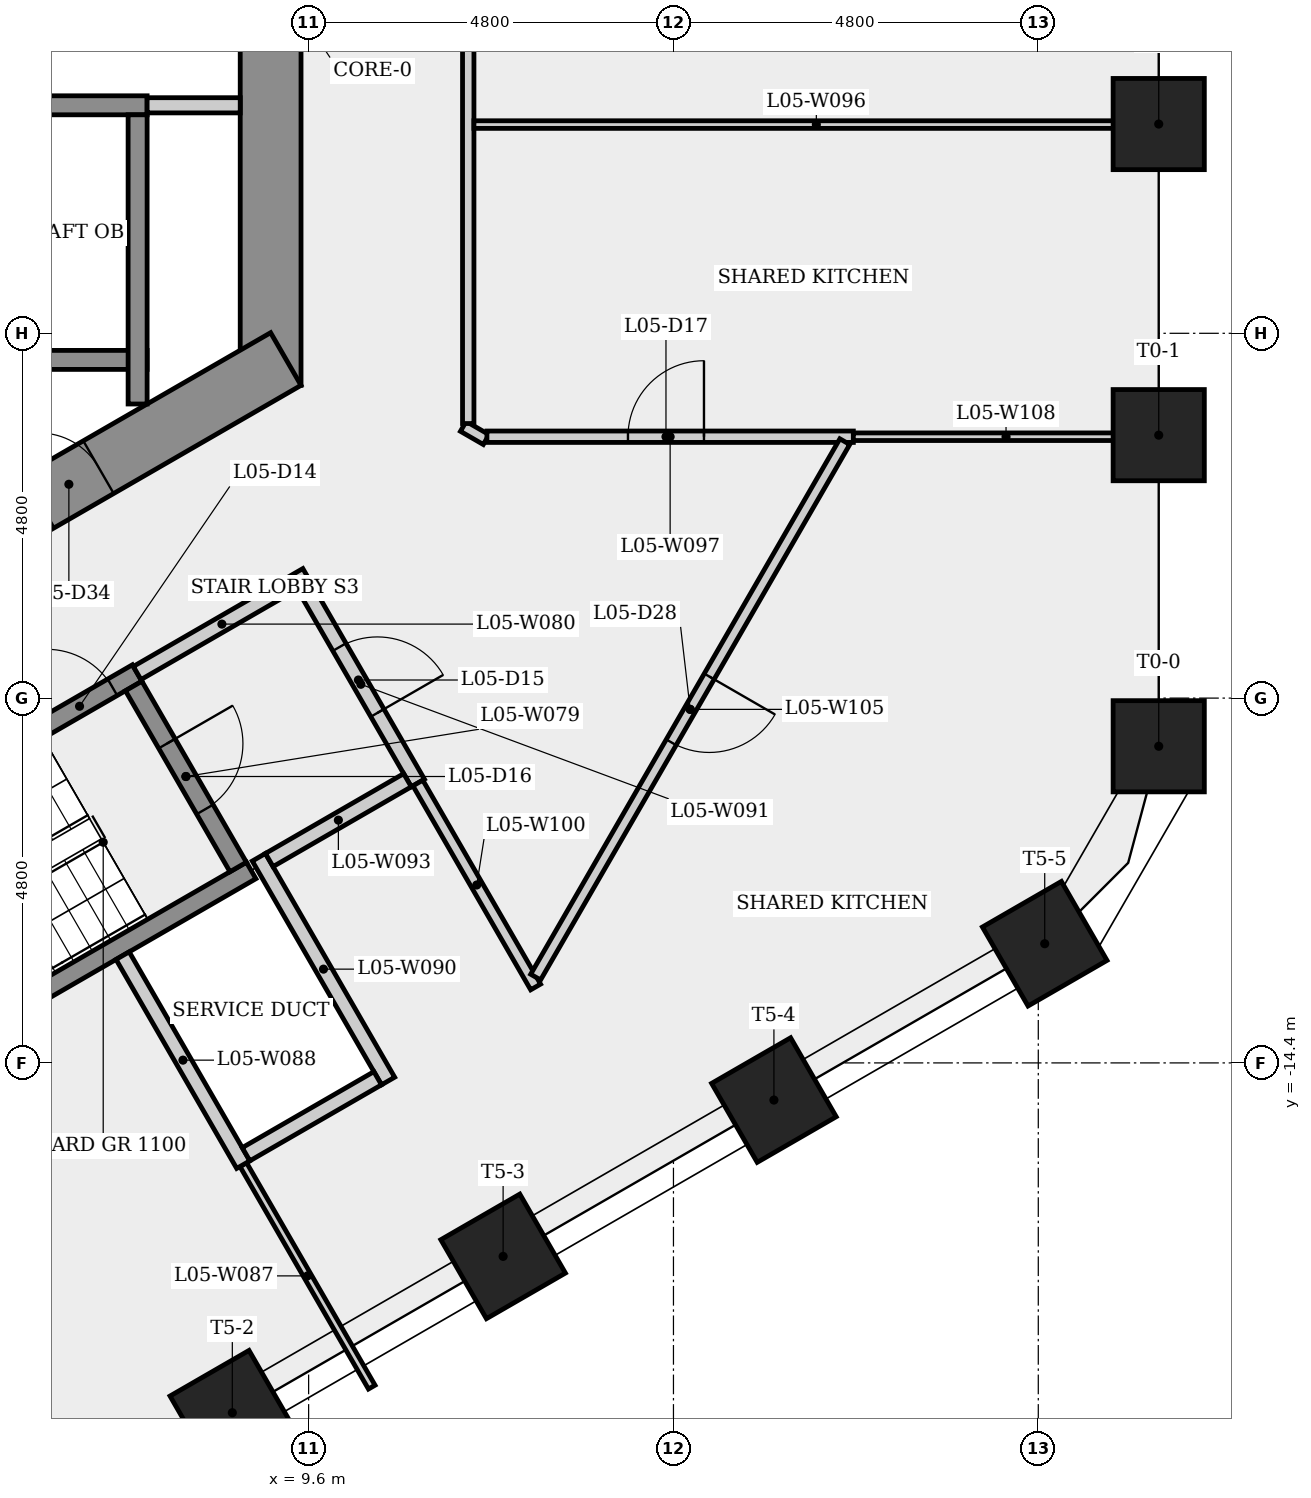
"""IFC4 building model, lengths in metres.
Left out: names, types, materials, properties, quantities, classifications, styles, units other than length and angle.
Written with IfcOpenShell. Run it as: python <this file> out.ifc"""

import sys

from ifc_helpers import new_model, si_unit, direction, frame, frame_2d, origin, origin_2d, place, context, subcontext, project, spatial, rectangle, extrude, element, fill, save


model = new_model("IFC4")
c1 = context("Model", 3, precision=1e-05, world=origin(), true_north=direction((0.0, 1.0)))
c2 = subcontext(c1, "Body", "Model", "MODEL_VIEW")
j1 = project(units=[si_unit("LENGTHUNIT", "METRE"), si_unit("PLANEANGLEUNIT", "RADIAN")], contexts=[c1])
p1 = place(None, origin())
s1 = spatial("IfcSite", under=j1, at=p1, CompositionType="ELEMENT")
p2 = place(p1, origin())
s2 = spatial("IfcBuilding", under=s1, at=p2, CompositionType="ELEMENT")
p3 = place(p2, frame((0.0, 0.0, 25.5)))
s3 = spatial("IfcBuildingStorey", under=s2, at=p3, CompositionType="ELEMENT", Elevation=25.5)
p4 = place(p3, frame((9.1, -5.485, 0.0), z_axis=(0.0, 0.0, 1.0), x_axis=(0.0, 1.0, 0.0)))
e1 = element("IfcWall", 1, at=p4, inside=s3, PredefinedType="SHEAR", context=c2, shape_type="SweptSolid", body=[
    extrude(rectangle(XDim=10.97, YDim=0.8, at=frame_2d((5.485, 0.0))), origin(), (0.0, 0.0, 1.0), 3.4),
])
p5 = place(p4, frame((4.685, 0.0, 0.0)))
e2 = element("IfcOpeningElement", 2, at=p5, cuts=e1, PredefinedType="OPENING", context=c2, shape_type="SweptSolid", body=[
    extrude(rectangle(XDim=1.6, YDim=2.1, at=frame_2d((0.8, 1.05))), frame((0.0, 0.41, 0.0), z_axis=(0.0, -1.0, 0.0), x_axis=(1.0, 0.0, 0.0)), (0.0, 0.0, 1.0), 0.82),
])
p6 = place(p3, frame((-0.2, -10.623, 0.0), z_axis=(0.0, 0.0, 1.0), x_axis=(0.866023993627, 0.500002442456, 0.0)))
e3 = element("IfcWall", 3, at=p6, inside=s3, PredefinedType="SHEAR", context=c2, shape_type="SweptSolid", body=[
    extrude(rectangle(XDim=10.97, YDim=0.8, at=frame_2d((5.485, 0.0))), origin(), (0.0, 0.0, 1.0), 3.4),
])
p7 = place(p6, frame((7.224, 0.0, 0.0)))
e4 = element("IfcOpeningElement", 4, at=p7, cuts=e3, PredefinedType="OPENING", context=c2, shape_type="SweptSolid", body=[
    extrude(rectangle(XDim=0.9, YDim=2.1, at=frame_2d((0.45, 1.05))), frame((0.0, 0.41, 0.0), z_axis=(0.0, -1.0, 0.0), x_axis=(1.0, 0.0, 0.0)), (0.0, 0.0, 1.0), 0.82),
])
for number, where, z_axis, x_axis in (
    (5, (20.785, -10.234, 0.0), (0.0, 0.0, 1.0), (1.0, 0.0, 0.0)),
    (6, (20.785, -6.14, 0.0), (0.0, 0.0, 1.0), (1.0, 0.0, 0.0)),
    (7, (20.785, -2.047, 0.0), (0.0, 0.0, 1.0), (1.0, 0.0, 0.0)),
    (8, (8.596, -19.003, 0.0), (0.0, 0.0, 1.0), (0.5, -0.866, 0.0)),
    (9, (12.159, -16.946, 0.0), (0.0, 0.0, 1.0), (0.5, -0.866, 0.0)),
    (10, (15.722, -14.889, 0.0), (0.0, 0.0, 1.0), (0.5, -0.866, 0.0)),
    (11, (19.285, -12.832, 0.0), (0.0, 0.0, 1.0), (0.5, -0.866, 0.0)),
):
    element("IfcColumn", number, at=place(p3, frame(where, z_axis=z_axis, x_axis=x_axis)), inside=s3, PredefinedType="COLUMN", context=c2, shape_type="SweptSolid", body=[
        extrude(rectangle(XDim=1.2, YDim=1.2, at=origin_2d()), origin(), (0.0, 0.0, 1.0), 3.4),
    ])
p8 = place(p3, frame((-7.225, -5.15, 0.0), z_axis=(0.0, 0.0, 1.0), x_axis=(1.0, 0.0, 0.0)))
e12 = element("IfcWall", 12, at=p8, inside=s3, PredefinedType="SHEAR", context=c2, shape_type="SweptSolid", body=[
    extrude(rectangle(XDim=14.7, YDim=0.25, at=frame_2d((7.35, 0.0))), origin(), (0.0, 0.0, 1.0), 3.05),
])
p9 = place(p3, frame((-7.225, -1.8, 0.0), z_axis=(0.0, 0.0, 1.0), x_axis=(1.0, 0.0, 0.0)))
e13 = element("IfcWall", 13, at=p9, inside=s3, PredefinedType="SHEAR", context=c2, shape_type="SweptSolid", body=[
    extrude(rectangle(XDim=14.7, YDim=0.25, at=frame_2d((7.35, 0.0))), origin(), (0.0, 0.0, 1.0), 3.05),
])
p10 = place(p9, frame((0.597, 0.0, 0.0)))
e14 = element("IfcOpeningElement", 14, at=p10, cuts=e13, PredefinedType="OPENING", context=c2, shape_type="SweptSolid", body=[
    extrude(rectangle(XDim=1.1, YDim=2.1, at=frame_2d((0.55, 1.05))), frame((0.0, 0.135, 0.0), z_axis=(0.0, -1.0, 0.0), x_axis=(1.0, 0.0, 0.0)), (0.0, 0.0, 1.0), 0.27),
])
p11 = place(p9, frame((3.0, 0.0, 0.0)))
e15 = element("IfcOpeningElement", 15, at=p11, cuts=e13, PredefinedType="OPENING", context=c2, shape_type="SweptSolid", body=[
    extrude(rectangle(XDim=1.1, YDim=2.1, at=frame_2d((0.55, 1.05))), frame((0.0, 0.135, 0.0), z_axis=(0.0, -1.0, 0.0), x_axis=(1.0, 0.0, 0.0)), (0.0, 0.0, 1.0), 0.27),
])
p12 = place(p9, frame((5.45, 0.0, 0.0)))
e16 = element("IfcOpeningElement", 16, at=p12, cuts=e13, PredefinedType="OPENING", context=c2, shape_type="SweptSolid", body=[
    extrude(rectangle(XDim=1.1, YDim=2.1, at=frame_2d((0.55, 1.05))), frame((0.0, 0.135, 0.0), z_axis=(0.0, -1.0, 0.0), x_axis=(1.0, 0.0, 0.0)), (0.0, 0.0, 1.0), 0.27),
])
p13 = place(p9, frame((7.9, 0.0, 0.0)))
e17 = element("IfcOpeningElement", 17, at=p13, cuts=e13, PredefinedType="OPENING", context=c2, shape_type="SweptSolid", body=[
    extrude(rectangle(XDim=1.1, YDim=2.1, at=frame_2d((0.55, 1.05))), frame((0.0, 0.135, 0.0), z_axis=(0.0, -1.0, 0.0), x_axis=(1.0, 0.0, 0.0)), (0.0, 0.0, 1.0), 0.27),
])
p14 = place(p9, frame((10.35, 0.0, 0.0)))
e18 = element("IfcOpeningElement", 18, at=p14, cuts=e13, PredefinedType="OPENING", context=c2, shape_type="SweptSolid", body=[
    extrude(rectangle(XDim=1.1, YDim=2.1, at=frame_2d((0.55, 1.05))), frame((0.0, 0.135, 0.0), z_axis=(0.0, -1.0, 0.0), x_axis=(1.0, 0.0, 0.0)), (0.0, 0.0, 1.0), 0.27),
])
p15 = place(p3, frame((1.585, -12.595, 0.0), z_axis=(0.0, 0.0, 1.0), x_axis=(0.866036417653, 0.499980922934, 0.0)))
e19 = element("IfcWall", 19, at=p15, inside=s3, PredefinedType="SHEAR", context=c2, shape_type="SweptSolid", body=[
    extrude(rectangle(XDim=6.65, YDim=0.25, at=frame_2d((3.325, 0.0))), origin(), (0.0, 0.0, 1.0), 3.05),
])
p16 = place(p15, frame((5.275, 0.0, 0.0)))
e20 = element("IfcOpeningElement", 20, at=p16, cuts=e19, PredefinedType="OPENING", context=c2, shape_type="SweptSolid", body=[
    extrude(rectangle(XDim=1.0, YDim=2.1, at=frame_2d((0.5, 1.05))), frame((0.0, 0.135, 0.0), z_axis=(0.0, -1.0, 0.0), x_axis=(1.0, 0.0, 0.0)), (0.0, 0.0, 1.0), 0.27),
])
p17 = place(p3, frame((3.301, -15.068, 0.0), z_axis=(0.0, 0.0, 1.0), x_axis=(0.866035036182, 0.499983315828, 0.0)))
e21 = element("IfcWall", 21, at=p17, inside=s3, PredefinedType="SHEAR", context=c2, shape_type="SweptSolid", body=[
    extrude(rectangle(XDim=6.4, YDim=0.25, at=frame_2d((3.2, 0.0))), origin(), (0.0, 0.0, 1.0), 3.05),
])
p18 = place(p3, frame((7.298, -9.441, 0.0), z_axis=(0.0, 0.0, 1.0), x_axis=(0.500034990121, -0.866005201286, 0.0)))
e22 = element("IfcWall", 22, at=p18, inside=s3, PredefinedType="SHEAR", context=c2, shape_type="SweptSolid", body=[
    extrude(rectangle(XDim=2.75, YDim=0.25, at=frame_2d((1.375, 0.0))), origin(), (0.0, 0.0, 1.0), 3.05),
])
p19 = place(p18, frame((0.875, 0.0, 0.0)))
e23 = element("IfcOpeningElement", 23, at=p19, cuts=e22, PredefinedType="OPENING", context=c2, shape_type="SweptSolid", body=[
    extrude(rectangle(XDim=1.0, YDim=2.1, at=frame_2d((0.5, 1.05))), frame((0.0, 0.135, 0.0), z_axis=(0.0, -1.0, 0.0), x_axis=(1.0, 0.0, 0.0)), (0.0, 0.0, 1.0), 0.27),
])
p20 = place(p3, frame((7.344, -9.27, 0.0), z_axis=(0.0, 0.0, 1.0), x_axis=(0.866005588531, 0.500034319456, 0.0)))
e24 = element("IfcWall", 24, at=p20, inside=s3, PredefinedType="PARTITIONING", context=c2, shape_type="SweptSolid", body=[
    extrude(rectangle(XDim=2.575, YDim=0.2, at=frame_2d((1.288, 0.0))), origin(), (0.0, 0.0, 1.0), 3.05),
])
p21 = place(p3, frame((7.35, -1.925, 0.0), z_axis=(0.0, 0.0, 1.0), x_axis=(0.0, -1.0, 0.0)))
e25 = element("IfcWall", 25, at=p21, inside=s3, PredefinedType="SHEAR", context=c2, shape_type="SweptSolid", body=[
    extrude(rectangle(XDim=3.805, YDim=0.25, at=frame_2d((1.903, 0.0))), origin(), (0.0, 0.0, 1.0), 3.05),
])
p22 = place(p3, frame((8.74, -15.738, 0.0), z_axis=(0.0, 0.0, 1.0), x_axis=(0.4999912383, -0.866030462295, 0.0)))
e26 = element("IfcWall", 26, at=p22, inside=s3, PredefinedType="PARTITIONING", context=c2, shape_type="SweptSolid", body=[
    extrude(rectangle(XDim=3.381, YDim=0.1, at=frame_2d((1.69, 0.0))), origin(), (0.0, 0.0, 1.0), 3.05),
])
p23 = place(p3, frame((8.74, -15.739, 0.0), z_axis=(0.0, 0.0, 1.0), x_axis=(-0.500017526161, 0.866015284814, 0.0)))
e27 = element("IfcWall", 27, at=p23, inside=s3, PredefinedType="PLUMBINGWALL", context=c2, shape_type="SweptSolid", body=[
    extrude(rectangle(XDim=3.175, YDim=0.2, at=frame_2d((1.588, 0.0))), origin(), (0.0, 0.0, 1.0), 3.05),
])
p24 = place(p3, frame((8.7, -1.8, 0.0), z_axis=(0.0, 0.0, 1.0), x_axis=(-1.0, 0.0, 0.0)))
e28 = element("IfcWall", 28, at=p24, inside=s3, PredefinedType="PARTITIONING", context=c2, shape_type="SweptSolid", body=[
    extrude(rectangle(XDim=1.225, YDim=0.2, at=frame_2d((0.613, 0.0))), origin(), (0.0, 0.0, 1.0), 3.05),
])
p25 = place(p3, frame((8.945, -11.694, 0.0), z_axis=(0.0, 0.0, 1.0), x_axis=(0.500062241894, -0.865989465428, 0.0)))
e29 = element("IfcWall", 29, at=p25, inside=s3, PredefinedType="PLUMBINGWALL", context=c2, shape_type="SweptSolid", body=[
    extrude(rectangle(XDim=3.4, YDim=0.2, at=frame_2d((1.7, 0.0))), origin(), (0.0, 0.0, 1.0), 3.05),
])
p26 = place(p3, frame((9.537, -8.119, 0.0), z_axis=(0.0, 0.0, 1.0), x_axis=(0.499990139034, -0.866031096941, 0.0)))
e30 = element("IfcWall", 30, at=p26, inside=s3, PredefinedType="PARTITIONING", context=c2, shape_type="SweptSolid", body=[
    extrude(rectangle(XDim=3.0, YDim=0.2, at=frame_2d((1.5, 0.0))), origin(), (0.0, 0.0, 1.0), 3.05),
])
p27 = place(p26, frame((0.935, 0.0, 0.0)))
e31 = element("IfcOpeningElement", 31, at=p27, cuts=e30, PredefinedType="OPENING", context=c2, shape_type="SweptSolid", body=[
    extrude(rectangle(XDim=1.0, YDim=2.1, at=frame_2d((0.5, 1.05))), frame((0.0, 0.11, 0.0), z_axis=(0.0, -1.0, 0.0), x_axis=(1.0, 0.0, 0.0)), (0.0, 0.0, 1.0), 0.22),
])
p28 = place(p3, frame((10.509, -14.602, 0.0), z_axis=(0.0, 0.0, 1.0), x_axis=(-0.866010750942, -0.50002537861, 0.0)))
e32 = element("IfcWall", 32, at=p28, inside=s3, PredefinedType="PLUMBINGWALL", context=c2, shape_type="SweptSolid", body=[
    extrude(rectangle(XDim=2.0, YDim=0.2, at=frame_2d((1.0, 0.0))), origin(), (0.0, 0.0, 1.0), 3.05),
])
p29 = place(p3, frame((10.901, -10.681, 0.0), z_axis=(0.0, 0.0, 1.0), x_axis=(-0.866009402589, -0.500027713859, 0.0)))
e33 = element("IfcWall", 33, at=p29, inside=s3, PredefinedType="PARTITIONING", context=c2, shape_type="SweptSolid", body=[
    extrude(rectangle(XDim=2.1, YDim=0.2, at=frame_2d((1.05, 0.0))), origin(), (0.0, 0.0, 1.0), 3.05),
])
p30 = place(p3, frame((11.635, -6.025, 0.0), z_axis=(0.0, 0.0, 1.0), x_axis=(0.866115353951, -0.499844169366, 0.0)))
e34 = element("IfcWall", 34, at=p30, inside=s3, PredefinedType="PARTITIONING", context=c2, shape_type="SweptSolid", body=[
    extrude(rectangle(XDim=0.347, YDim=0.15, at=frame_2d((0.174, 0.0))), origin(), (0.0, 0.0, 1.0), 3.05),
])
p31 = place(p3, frame((11.7, -5.987, 0.0), z_axis=(0.0, 0.0, 1.0), x_axis=(0.0, 1.0, 0.0)))
e35 = element("IfcWall", 35, at=p31, inside=s3, PredefinedType="PARTITIONING", context=c2, shape_type="SweptSolid", body=[
    extrude(rectangle(XDim=12.125, YDim=0.15, at=frame_2d((6.062, 0.0))), origin(), (0.0, 0.0, 1.0), 3.05),
])
p32 = place(p31, frame((7.507, 0.0, 0.0)))
e36 = element("IfcOpeningElement", 36, at=p32, cuts=e35, PredefinedType="OPENING", context=c2, shape_type="SweptSolid", body=[
    extrude(rectangle(XDim=1.0, YDim=2.1, at=frame_2d((0.5, 1.05))), frame((0.0, 0.085, 0.0), z_axis=(0.0, -1.0, 0.0), x_axis=(1.0, 0.0, 0.0)), (0.0, 0.0, 1.0), 0.17),
])
p33 = place(p3, frame((11.775, -2.054, 0.0), z_axis=(0.0, 0.0, 1.0), x_axis=(1.0, 0.0, 0.0)))
e37 = element("IfcWall", 37, at=p33, inside=s3, PredefinedType="PARTITIONING", context=c2, shape_type="SweptSolid", body=[
    extrude(rectangle(XDim=9.01, YDim=0.1, at=frame_2d((4.505, 0.0))), origin(), (0.0, 0.0, 1.0), 3.05),
])
p34 = place(p3, frame((11.946, -6.161, 0.0), z_axis=(0.0, 0.0, 1.0), x_axis=(1.0, 0.0, 0.0)))
e38 = element("IfcWall", 38, at=p34, inside=s3, PredefinedType="PARTITIONING", context=c2, shape_type="SweptSolid", body=[
    extrude(rectangle(XDim=4.821, YDim=0.15, at=frame_2d((2.411, 0.0))), origin(), (0.0, 0.0, 1.0), 3.05),
])
p35 = place(p34, frame((1.856, 0.0, 0.0)))
e39 = element("IfcOpeningElement", 39, at=p35, cuts=e38, PredefinedType="OPENING", context=c2, shape_type="SweptSolid", body=[
    extrude(rectangle(XDim=1.0, YDim=2.1, at=frame_2d((0.5, 1.05))), frame((0.0, 0.085, 0.0), z_axis=(0.0, -1.0, 0.0), x_axis=(1.0, 0.0, 0.0)), (0.0, 0.0, 1.0), 0.17),
])
p36 = place(p3, frame((12.587, -13.401, 0.0), z_axis=(0.0, 0.0, 1.0), x_axis=(-0.499952049853, 0.866053086045, 0.0)))
e40 = element("IfcWall", 40, at=p36, inside=s3, PredefinedType="PARTITIONING", context=c2, shape_type="SweptSolid", body=[
    extrude(rectangle(XDim=3.099, YDim=0.15, at=frame_2d((1.549, 0.0))), origin(), (0.0, 0.0, 1.0), 3.05),
])
p37 = place(p3, frame((16.654, -6.226, 0.0), z_axis=(0.0, 0.0, 1.0), x_axis=(-0.499996082157, -0.86602766574, 0.0)))
e41 = element("IfcWall", 41, at=p37, inside=s3, PredefinedType="PARTITIONING", context=c2, shape_type="SweptSolid", body=[
    extrude(rectangle(XDim=8.135, YDim=0.15, at=frame_2d((4.068, 0.0))), origin(), (0.0, 0.0, 1.0), 3.05),
])
p38 = place(p37, frame((3.568, 0.0, 0.0)))
e42 = element("IfcOpeningElement", 42, at=p38, cuts=e41, PredefinedType="OPENING", context=c2, shape_type="SweptSolid", body=[
    extrude(rectangle(XDim=1.0, YDim=2.1, at=frame_2d((0.5, 1.05))), frame((0.0, 0.085, 0.0), z_axis=(0.0, -1.0, 0.0), x_axis=(1.0, 0.0, 0.0)), (0.0, 0.0, 1.0), 0.17),
])
p39 = place(p3, frame((20.785, -6.161, 0.0), z_axis=(0.0, 0.0, 1.0), x_axis=(-1.0, 0.0, 0.0)))
e43 = element("IfcWall", 43, at=p39, inside=s3, PredefinedType="PARTITIONING", context=c2, shape_type="SweptSolid", body=[
    extrude(rectangle(XDim=4.018, YDim=0.1, at=frame_2d((2.009, 0.0))), origin(), (0.0, 0.0, 1.0), 3.05),
])
p40 = place(p16, origin())
e44 = element("IfcDoor", 44, at=p40, inside=s3, OperationType="SINGLE_SWING_LEFT", PredefinedType="DOOR", context=c2, shape_type="SweptSolid", body=[
    extrude(rectangle(XDim=1.0, YDim=2.1, at=frame_2d((0.5, 1.05))), frame((0.0, 0.025, 0.0), z_axis=(0.0, -1.0, 0.0), x_axis=(1.0, 0.0, 0.0)), (0.0, 0.0, 1.0), 0.05),
])
fill(e20, e44)
p41 = place(p27, origin())
e45 = element("IfcDoor", 45, at=p41, inside=s3, OperationType="SINGLE_SWING_RIGHT", PredefinedType="DOOR", context=c2, shape_type="SweptSolid", body=[
    extrude(rectangle(XDim=1.0, YDim=2.1, at=frame_2d((0.5, 1.05))), frame((0.0, 0.025, 0.0), z_axis=(0.0, -1.0, 0.0), x_axis=(1.0, 0.0, 0.0)), (0.0, 0.0, 1.0), 0.05),
])
fill(e31, e45)
p42 = place(p19, origin())
e46 = element("IfcDoor", 46, at=p42, inside=s3, OperationType="SINGLE_SWING_LEFT", PredefinedType="DOOR", context=c2, shape_type="SweptSolid", body=[
    extrude(rectangle(XDim=1.0, YDim=2.1, at=frame_2d((0.5, 1.05))), frame((0.0, 0.025, 0.0), z_axis=(0.0, -1.0, 0.0), x_axis=(1.0, 0.0, 0.0)), (0.0, 0.0, 1.0), 0.05),
])
fill(e23, e46)
p43 = place(p35, origin())
e47 = element("IfcDoor", 47, at=p43, inside=s3, OperationType="SINGLE_SWING_RIGHT", PredefinedType="DOOR", context=c2, shape_type="SweptSolid", body=[
    extrude(rectangle(XDim=1.0, YDim=2.1, at=frame_2d((0.5, 1.05))), frame((0.0, 0.025, 0.0), z_axis=(0.0, -1.0, 0.0), x_axis=(1.0, 0.0, 0.0)), (0.0, 0.0, 1.0), 0.05),
])
fill(e39, e47)
p44 = place(p38, origin())
e48 = element("IfcDoor", 48, at=p44, inside=s3, OperationType="SINGLE_SWING_LEFT", PredefinedType="DOOR", context=c2, shape_type="SweptSolid", body=[
    extrude(rectangle(XDim=1.0, YDim=2.1, at=frame_2d((0.5, 1.05))), frame((0.0, 0.025, 0.0), z_axis=(0.0, -1.0, 0.0), x_axis=(1.0, 0.0, 0.0)), (0.0, 0.0, 1.0), 0.05),
])
fill(e42, e48)
p45 = place(p7, origin())
e49 = element("IfcDoor", 49, at=p45, inside=s3, OperationType="SINGLE_SWING_LEFT", PredefinedType="DOOR", context=c2, shape_type="SweptSolid", body=[
    extrude(rectangle(XDim=0.9, YDim=2.1, at=frame_2d((0.45, 1.05))), frame((0.0, 0.025, 0.0), z_axis=(0.0, -1.0, 0.0), x_axis=(1.0, 0.0, 0.0)), (0.0, 0.0, 1.0), 0.05),
])
fill(e4, e49)
save(model, sys.argv[1])
